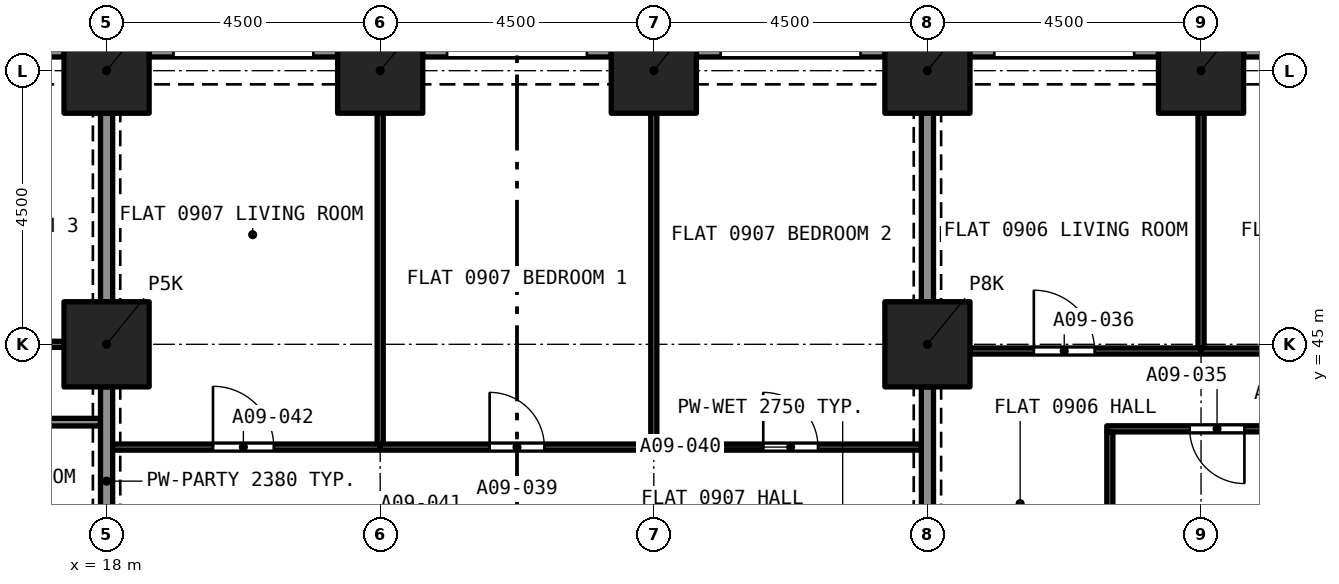
"""IFC4 building model, lengths in metres.
Left out: names, types, materials, properties, quantities, classifications, styles, units other than length and angle.
Written with IfcOpenShell. Run it as: python <this file> out.ifc"""

import sys

from ifc_helpers import new_model, si_unit, direction, frame, frame_2d, origin, origin_2d, place, context, subcontext, project, spatial, rectangle, extrude, element, fill, save


model = new_model("IFC4")
c1 = context("Model", 3, precision=1e-05, world=origin(), true_north=direction((0.0, 1.0)))
c2 = subcontext(c1, "Body", "Model", "MODEL_VIEW")
j1 = project(units=[si_unit("LENGTHUNIT", "METRE"), si_unit("PLANEANGLEUNIT", "RADIAN")], contexts=[c1])
p1 = place(None, origin())
s1 = spatial("IfcSite", under=j1, at=p1, CompositionType="ELEMENT")
p2 = place(p1, origin())
s2 = spatial("IfcBuilding", under=s1, at=p2, CompositionType="ELEMENT")
p3 = place(p2, frame((0.0, 0.0, 40.0)))
s3 = spatial("IfcBuildingStorey", under=s2, at=p3, CompositionType="ELEMENT", Elevation=40.0)
for number, where, z_axis, x_axis in (
    (1, (18.0, 45.0, 0.0), (0.0, 0.0, 1.0), (1.0, 0.0, 0.0)),
    (2, (31.5, 45.0, 0.0), (0.0, 0.0, 1.0), (1.0, 0.0, 0.0)),
    (3, (18.0, 49.5, 0.0), (0.0, 0.0, 1.0), (1.0, 0.0, 0.0)),
    (4, (22.5, 49.5, 0.0), (0.0, 0.0, 1.0), (1.0, 0.0, 0.0)),
    (5, (27.0, 49.5, 0.0), (0.0, 0.0, 1.0), (1.0, 0.0, 0.0)),
    (6, (31.5, 49.5, 0.0), (0.0, 0.0, 1.0), (1.0, 0.0, 0.0)),
    (7, (36.0, 49.5, 0.0), (0.0, 0.0, 1.0), (1.0, 0.0, 0.0)),
):
    element("IfcColumn", number, at=place(p3, frame(where, z_axis=z_axis, x_axis=x_axis)), inside=s3, PredefinedType="COLUMN", context=c2, shape_type="SweptSolid", body=[
        extrude(rectangle(XDim=1.4, YDim=1.4, at=origin_2d()), origin(), (0.0, 0.0, 1.0), 3.2),
    ])
p4 = place(p3, frame((36.7, 49.875, 0.0), z_axis=(0.0, 0.0, 1.0), x_axis=(1.0, 0.0, 0.0)))
e8 = element("IfcWall", 8, at=p4, inside=s3, PredefinedType="SOLIDWALL", context=c2, shape_type="SweptSolid", body=[
    extrude(rectangle(XDim=3.1, YDim=0.3, at=frame_2d((1.55, 0.0))), origin(), (0.0, 0.0, 1.0), 3.2),
])
p5 = place(p4, frame((0.4, 0.0, 0.45)))
e9 = element("IfcOpeningElement", 9, at=p5, cuts=e8, PredefinedType="OPENING", context=c2, shape_type="SweptSolid", body=[
    extrude(rectangle(XDim=2.3, YDim=1.95, at=frame_2d((1.15, 0.975))), frame((0.0, 0.16, 0.0), z_axis=(0.0, -1.0, 0.0), x_axis=(1.0, 0.0, 0.0)), (0.0, 0.0, 1.0), 0.32),
])
p6 = place(p3, frame((32.2, 49.875, 0.0), z_axis=(0.0, 0.0, 1.0), x_axis=(1.0, 0.0, 0.0)))
e10 = element("IfcWall", 10, at=p6, inside=s3, PredefinedType="SOLIDWALL", context=c2, shape_type="SweptSolid", body=[
    extrude(rectangle(XDim=3.1, YDim=0.3, at=frame_2d((1.55, 0.0))), origin(), (0.0, 0.0, 1.0), 3.2),
])
p7 = place(p6, frame((0.4, 0.0, 0.45)))
e11 = element("IfcOpeningElement", 11, at=p7, cuts=e10, PredefinedType="OPENING", context=c2, shape_type="SweptSolid", body=[
    extrude(rectangle(XDim=2.3, YDim=1.95, at=frame_2d((1.15, 0.975))), frame((0.0, 0.16, 0.0), z_axis=(0.0, -1.0, 0.0), x_axis=(1.0, 0.0, 0.0)), (0.0, 0.0, 1.0), 0.32),
])
p8 = place(p3, frame((27.7, 49.875, 0.0), z_axis=(0.0, 0.0, 1.0), x_axis=(1.0, 0.0, 0.0)))
e12 = element("IfcWall", 12, at=p8, inside=s3, PredefinedType="SOLIDWALL", context=c2, shape_type="SweptSolid", body=[
    extrude(rectangle(XDim=3.1, YDim=0.3, at=frame_2d((1.55, 0.0))), origin(), (0.0, 0.0, 1.0), 3.2),
])
p9 = place(p8, frame((0.4, 0.0, 0.45)))
e13 = element("IfcOpeningElement", 13, at=p9, cuts=e12, PredefinedType="OPENING", context=c2, shape_type="SweptSolid", body=[
    extrude(rectangle(XDim=2.3, YDim=1.95, at=frame_2d((1.15, 0.975))), frame((0.0, 0.16, 0.0), z_axis=(0.0, -1.0, 0.0), x_axis=(1.0, 0.0, 0.0)), (0.0, 0.0, 1.0), 0.32),
])
p10 = place(p3, frame((23.2, 49.875, 0.0), z_axis=(0.0, 0.0, 1.0), x_axis=(1.0, 0.0, 0.0)))
e14 = element("IfcWall", 14, at=p10, inside=s3, PredefinedType="SOLIDWALL", context=c2, shape_type="SweptSolid", body=[
    extrude(rectangle(XDim=3.1, YDim=0.3, at=frame_2d((1.55, 0.0))), origin(), (0.0, 0.0, 1.0), 3.2),
])
p11 = place(p10, frame((0.4, 0.0, 0.45)))
e15 = element("IfcOpeningElement", 15, at=p11, cuts=e14, PredefinedType="OPENING", context=c2, shape_type="SweptSolid", body=[
    extrude(rectangle(XDim=2.3, YDim=1.95, at=frame_2d((1.15, 0.975))), frame((0.0, 0.16, 0.0), z_axis=(0.0, -1.0, 0.0), x_axis=(1.0, 0.0, 0.0)), (0.0, 0.0, 1.0), 0.32),
])
p12 = place(p3, frame((18.7, 49.875, 0.0), z_axis=(0.0, 0.0, 1.0), x_axis=(1.0, 0.0, 0.0)))
e16 = element("IfcWall", 16, at=p12, inside=s3, PredefinedType="SOLIDWALL", context=c2, shape_type="SweptSolid", body=[
    extrude(rectangle(XDim=3.1, YDim=0.3, at=frame_2d((1.55, 0.0))), origin(), (0.0, 0.0, 1.0), 3.2),
])
p13 = place(p12, frame((0.4, 0.0, 0.45)))
e17 = element("IfcOpeningElement", 17, at=p13, cuts=e16, PredefinedType="OPENING", context=c2, shape_type="SweptSolid", body=[
    extrude(rectangle(XDim=2.3, YDim=1.95, at=frame_2d((1.15, 0.975))), frame((0.0, 0.16, 0.0), z_axis=(0.0, -1.0, 0.0), x_axis=(1.0, 0.0, 0.0)), (0.0, 0.0, 1.0), 0.32),
])
p14 = place(p3, frame((14.2, 49.875, 0.0), z_axis=(0.0, 0.0, 1.0), x_axis=(1.0, 0.0, 0.0)))
e18 = element("IfcWall", 18, at=p14, inside=s3, PredefinedType="SOLIDWALL", context=c2, shape_type="SweptSolid", body=[
    extrude(rectangle(XDim=3.1, YDim=0.3, at=frame_2d((1.55, 0.0))), origin(), (0.0, 0.0, 1.0), 3.2),
])
p15 = place(p14, frame((0.4, 0.0, 0.45)))
e19 = element("IfcOpeningElement", 19, at=p15, cuts=e18, PredefinedType="OPENING", context=c2, shape_type="SweptSolid", body=[
    extrude(rectangle(XDim=2.3, YDim=1.95, at=frame_2d((1.15, 0.975))), frame((0.0, 0.16, 0.0), z_axis=(0.0, -1.0, 0.0), x_axis=(1.0, 0.0, 0.0)), (0.0, 0.0, 1.0), 0.32),
])
p16 = place(p3, frame((17.9, 43.72, 0.0), z_axis=(0.0, 0.0, 1.0), x_axis=(-1.0, 0.0, 0.0)))
e20 = element("IfcWall", 20, at=p16, inside=s3, PredefinedType="PARTITIONING", context=c2, shape_type="SweptSolid", body=[
    extrude(rectangle(XDim=4.327, YDim=0.125, at=frame_2d((2.163, 0.0))), origin(), (0.0, 0.0, 1.0), 2.9),
])
p17 = place(p16, frame((1.713, 0.0, 0.0)))
e21 = element("IfcOpeningElement", 21, at=p17, cuts=e20, PredefinedType="OPENING", context=c2, shape_type="SweptSolid", body=[
    extrude(rectangle(XDim=0.8, YDim=2.1, at=frame_2d((0.4, 1.05))), frame((0.0, 0.073, 0.0), z_axis=(0.0, -1.0, 0.0), x_axis=(1.0, 0.0, 0.0)), (0.0, 0.0, 1.0), 0.145),
])
p18 = place(p3, frame((18.0, 41.2, 0.0), z_axis=(0.0, 0.0, 1.0), x_axis=(0.0, 1.0, 0.0)))
e22 = element("IfcWall", 22, at=p18, inside=s3, PredefinedType="PARTITIONING", context=c2, shape_type="SweptSolid", body=[
    extrude(rectangle(XDim=3.1, YDim=0.2, at=frame_2d((1.55, 0.0))), origin(), (0.0, 0.0, 1.0), 2.38),
])
p19 = place(p3, frame((13.5, 45.0, 0.0), z_axis=(0.0, 0.0, 1.0), x_axis=(1.0, 0.0, 0.0)))
e23 = element("IfcWall", 23, at=p19, inside=s3, PredefinedType="PARTITIONING", context=c2, shape_type="SweptSolid", body=[
    extrude(rectangle(XDim=3.8, YDim=0.1, at=frame_2d((1.9, 0.0))), origin(), (0.0, 0.0, 1.0), 2.9),
])
p20 = place(p19, frame((1.8, 0.0, 0.0)))
e24 = element("IfcOpeningElement", 24, at=p20, cuts=e23, PredefinedType="OPENING", context=c2, shape_type="SweptSolid", body=[
    extrude(rectangle(XDim=0.9, YDim=2.1, at=frame_2d((0.45, 1.05))), frame((0.0, 0.06, 0.0), z_axis=(0.0, -1.0, 0.0), x_axis=(1.0, 0.0, 0.0)), (0.0, 0.0, 1.0), 0.12),
])
p21 = place(p3, frame((18.0, 45.7, 0.0), z_axis=(0.0, 0.0, 1.0), x_axis=(0.0, 1.0, 0.0)))
e25 = element("IfcWall", 25, at=p21, inside=s3, PredefinedType="PARTITIONING", context=c2, shape_type="SweptSolid", body=[
    extrude(rectangle(XDim=3.1, YDim=0.2, at=frame_2d((1.55, 0.0))), origin(), (0.0, 0.0, 1.0), 2.38),
])
p22 = place(p3, frame((36.0, 44.89, 0.0), z_axis=(0.0, 0.0, 1.0), x_axis=(1.0, 0.0, 0.0)))
e26 = element("IfcWall", 26, at=p22, inside=s3, PredefinedType="PARTITIONING", context=c2, shape_type="SweptSolid", body=[
    extrude(rectangle(XDim=4.4, YDim=0.1, at=frame_2d((2.2, 0.0))), origin(), (0.0, 0.0, 1.0), 2.9),
])
p23 = place(p22, frame((1.8, 0.0, 0.0)))
e27 = element("IfcOpeningElement", 27, at=p23, cuts=e26, PredefinedType="OPENING", context=c2, shape_type="SweptSolid", body=[
    extrude(rectangle(XDim=0.9, YDim=2.1, at=frame_2d((0.45, 1.05))), frame((0.0, 0.06, 0.0), z_axis=(0.0, -1.0, 0.0), x_axis=(1.0, 0.0, 0.0)), (0.0, 0.0, 1.0), 0.12),
])
p24 = place(p3, frame((36.0, 44.94, 0.0), z_axis=(0.0, 0.0, 1.0), x_axis=(0.0, 1.0, 0.0)))
e28 = element("IfcWall", 28, at=p24, inside=s3, PredefinedType="PARTITIONING", context=c2, shape_type="SweptSolid", body=[
    extrude(rectangle(XDim=3.86, YDim=0.1, at=frame_2d((1.93, 0.0))), origin(), (0.0, 0.0, 1.0), 2.9),
])
p25 = place(p3, frame((38.027, 43.61, 0.0), z_axis=(0.0, 0.0, 1.0), x_axis=(-1.0, 0.0, 0.0)))
e29 = element("IfcWall", 29, at=p25, inside=s3, PredefinedType="PARTITIONING", context=c2, shape_type="SweptSolid", body=[
    extrude(rectangle(XDim=3.577, YDim=0.1, at=frame_2d((1.788, 0.0))), origin(), (0.0, 0.0, 1.0), 2.9),
])
p26 = place(p25, frame((1.313, 0.0, 0.0)))
e30 = element("IfcOpeningElement", 30, at=p26, cuts=e29, PredefinedType="OPENING", context=c2, shape_type="SweptSolid", body=[
    extrude(rectangle(XDim=0.9, YDim=2.1, at=frame_2d((0.45, 1.05))), frame((0.0, 0.06, 0.0), z_axis=(0.0, -1.0, 0.0), x_axis=(1.0, 0.0, 0.0)), (0.0, 0.0, 1.0), 0.12),
])
p27 = place(p3, frame((34.5, 40.575, 0.0), z_axis=(0.0, 0.0, 1.0), x_axis=(0.0, 1.0, 0.0)))
e31 = element("IfcWall", 31, at=p27, inside=s3, PredefinedType="PARTITIONING", context=c2, shape_type="SweptSolid", body=[
    extrude(rectangle(XDim=2.985, YDim=0.1, at=frame_2d((1.493, 0.0))), origin(), (0.0, 0.0, 1.0), 2.9),
])
p28 = place(p3, frame((32.2, 44.89, 0.0), z_axis=(0.0, 0.0, 1.0), x_axis=(1.0, 0.0, 0.0)))
e32 = element("IfcWall", 32, at=p28, inside=s3, PredefinedType="PARTITIONING", context=c2, shape_type="SweptSolid", body=[
    extrude(rectangle(XDim=3.8, YDim=0.1, at=frame_2d((1.9, 0.0))), origin(), (0.0, 0.0, 1.0), 2.9),
])
p29 = place(p28, frame((1.05, 0.0, 0.0)))
e33 = element("IfcOpeningElement", 33, at=p29, cuts=e32, PredefinedType="OPENING", context=c2, shape_type="SweptSolid", body=[
    extrude(rectangle(XDim=1.0, YDim=2.1, at=frame_2d((0.5, 1.05))), frame((0.0, 0.06, 0.0), z_axis=(0.0, -1.0, 0.0), x_axis=(1.0, 0.0, 0.0)), (0.0, 0.0, 1.0), 0.12),
])
for number, where, z_axis, x_axis in (
    (34, (31.5, 41.2, 0.0), (0.0, 0.0, 1.0), (0.0, 1.0, 0.0)),
    (35, (31.5, 45.7, 0.0), (0.0, 0.0, 1.0), (0.0, 1.0, 0.0)),
):
    element("IfcWall", number, at=place(p3, frame(where, z_axis=z_axis, x_axis=x_axis)), inside=s3, PredefinedType="PARTITIONING", context=c2, shape_type="SweptSolid", body=[
        extrude(rectangle(XDim=3.1, YDim=0.2, at=frame_2d((1.55, 0.0))), origin(), (0.0, 0.0, 1.0), 2.38),
    ])
p30 = place(p3, frame((27.0, 43.36, 0.0), z_axis=(0.0, 0.0, 1.0), x_axis=(0.0, 1.0, 0.0)))
e36 = element("IfcWall", 36, at=p30, inside=s3, PredefinedType="PARTITIONING", context=c2, shape_type="SweptSolid", body=[
    extrude(rectangle(XDim=5.44, YDim=0.1, at=frame_2d((2.72, 0.0))), origin(), (0.0, 0.0, 1.0), 2.75),
])
p31 = place(p3, frame((22.5, 43.31, 0.0), z_axis=(0.0, 0.0, 1.0), x_axis=(1.0, 0.0, 0.0)))
e37 = element("IfcWall", 37, at=p31, inside=s3, PredefinedType="PARTITIONING", context=c2, shape_type="SweptSolid", body=[
    extrude(rectangle(XDim=4.5, YDim=0.1, at=frame_2d((2.25, 0.0))), origin(), (0.0, 0.0, 1.0), 2.75),
])
p32 = place(p31, frame((1.8, 0.0, 0.0)))
e38 = element("IfcOpeningElement", 38, at=p32, cuts=e37, PredefinedType="OPENING", context=c2, shape_type="SweptSolid", body=[
    extrude(rectangle(XDim=0.9, YDim=2.1, at=frame_2d((0.45, 1.05))), frame((0.0, 0.06, 0.0), z_axis=(0.0, -1.0, 0.0), x_axis=(1.0, 0.0, 0.0)), (0.0, 0.0, 1.0), 0.12),
])
p33 = place(p3, frame((22.5, 43.36, 0.0), z_axis=(0.0, 0.0, 1.0), x_axis=(0.0, 1.0, 0.0)))
e39 = element("IfcWall", 39, at=p33, inside=s3, PredefinedType="PARTITIONING", context=c2, shape_type="SweptSolid", body=[
    extrude(rectangle(XDim=5.44, YDim=0.1, at=frame_2d((2.72, 0.0))), origin(), (0.0, 0.0, 1.0), 2.75),
])
p34 = place(p3, frame((27.0, 43.31, 0.0), z_axis=(0.0, 0.0, 1.0), x_axis=(1.0, 0.0, 0.0)))
e40 = element("IfcWall", 40, at=p34, inside=s3, PredefinedType="PARTITIONING", context=c2, shape_type="SweptSolid", body=[
    extrude(rectangle(XDim=4.4, YDim=0.1, at=frame_2d((2.2, 0.0))), origin(), (0.0, 0.0, 1.0), 2.75),
])
p35 = place(p34, frame((1.8, 0.0, 0.0)))
e41 = element("IfcOpeningElement", 41, at=p35, cuts=e40, PredefinedType="OPENING", context=c2, shape_type="SweptSolid", body=[
    extrude(rectangle(XDim=0.9, YDim=2.1, at=frame_2d((0.45, 1.05))), frame((0.0, 0.06, 0.0), z_axis=(0.0, -1.0, 0.0), x_axis=(1.0, 0.0, 0.0)), (0.0, 0.0, 1.0), 0.12),
])
p36 = place(p3, frame((18.1, 43.31, 0.0), z_axis=(0.0, 0.0, 1.0), x_axis=(1.0, 0.0, 0.0)))
e42 = element("IfcWall", 42, at=p36, inside=s3, PredefinedType="PARTITIONING", context=c2, shape_type="SweptSolid", body=[
    extrude(rectangle(XDim=4.4, YDim=0.1, at=frame_2d((2.2, 0.0))), origin(), (0.0, 0.0, 1.0), 2.75),
])
p37 = place(p36, frame((1.65, 0.0, 0.0)))
e43 = element("IfcOpeningElement", 43, at=p37, cuts=e42, PredefinedType="OPENING", context=c2, shape_type="SweptSolid", body=[
    extrude(rectangle(XDim=1.0, YDim=2.1, at=frame_2d((0.5, 1.05))), frame((0.0, 0.06, 0.0), z_axis=(0.0, -1.0, 0.0), x_axis=(1.0, 0.0, 0.0)), (0.0, 0.0, 1.0), 0.12),
])
p38 = place(p26, origin())
e44 = element("IfcDoor", 44, at=p38, inside=s3, OperationType="SINGLE_SWING_LEFT", PredefinedType="DOOR", context=c2, shape_type="SweptSolid", body=[
    extrude(rectangle(XDim=0.9, YDim=2.1, at=frame_2d((0.45, 1.05))), frame((0.0, 0.025, 0.0), z_axis=(0.0, -1.0, 0.0), x_axis=(1.0, 0.0, 0.0)), (0.0, 0.0, 1.0), 0.05),
])
fill(e30, e44)
p39 = place(p29, origin())
e45 = element("IfcDoor", 45, at=p39, inside=s3, OperationType="SINGLE_SWING_LEFT", PredefinedType="DOOR", context=c2, shape_type="SweptSolid", body=[
    extrude(rectangle(XDim=1.0, YDim=2.1, at=frame_2d((0.5, 1.05))), frame((0.0, 0.025, 0.0), z_axis=(0.0, -1.0, 0.0), x_axis=(1.0, 0.0, 0.0)), (0.0, 0.0, 1.0), 0.05),
])
fill(e33, e45)
p40 = place(p32, origin())
e46 = element("IfcDoor", 46, at=p40, inside=s3, OperationType="SINGLE_SWING_LEFT", PredefinedType="DOOR", context=c2, shape_type="SweptSolid", body=[
    extrude(rectangle(XDim=0.9, YDim=2.1, at=frame_2d((0.45, 1.05))), frame((0.0, 0.025, 0.0), z_axis=(0.0, -1.0, 0.0), x_axis=(1.0, 0.0, 0.0)), (0.0, 0.0, 1.0), 0.05),
])
fill(e38, e46)
p41 = place(p35, origin())
e47 = element("IfcDoor", 47, at=p41, inside=s3, OperationType="SINGLE_SWING_RIGHT", PredefinedType="DOOR", context=c2, shape_type="SweptSolid", body=[
    extrude(rectangle(XDim=0.9, YDim=2.1, at=frame_2d((0.45, 1.05))), frame((0.0, 0.025, 0.0), z_axis=(0.0, -1.0, 0.0), x_axis=(1.0, 0.0, 0.0)), (0.0, 0.0, 1.0), 0.05),
])
fill(e41, e47)
p42 = place(p37, origin())
e48 = element("IfcDoor", 48, at=p42, inside=s3, OperationType="SINGLE_SWING_LEFT", PredefinedType="DOOR", context=c2, shape_type="SweptSolid", body=[
    extrude(rectangle(XDim=1.0, YDim=2.1, at=frame_2d((0.5, 1.05))), frame((0.0, 0.025, 0.0), z_axis=(0.0, -1.0, 0.0), x_axis=(1.0, 0.0, 0.0)), (0.0, 0.0, 1.0), 0.05),
])
fill(e43, e48)
save(model, sys.argv[1])
